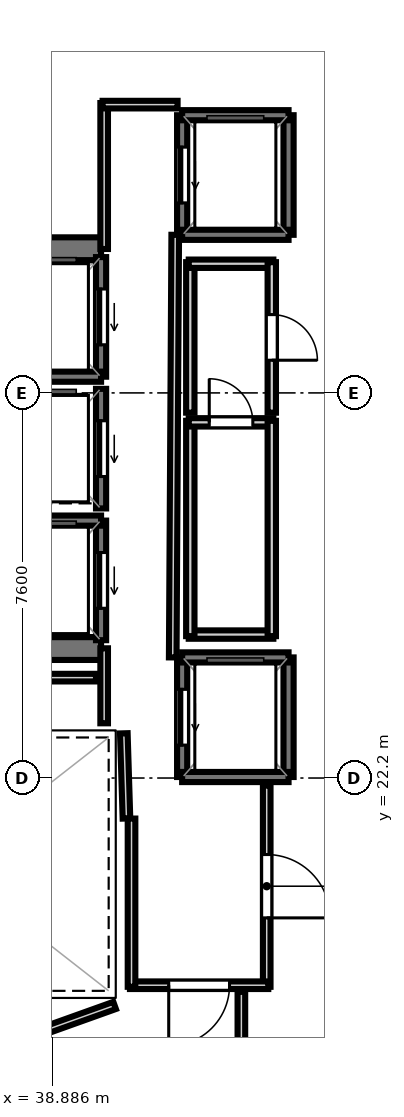
"""IFC4 building model, lengths in metres.
Left out: names, types, materials, properties, quantities, classifications, styles, units other than length and angle.
Written with IfcOpenShell. Run it as: python <this file> out.ifc"""

import sys

from ifc_helpers import new_model, si_unit, direction, frame, frame_2d, origin, place, context, subcontext, project, spatial, rectangle, extrude, element, fill, save


model = new_model("IFC4")
c1 = context("Model", 3, precision=1e-05, world=origin(), true_north=direction((0.0, 1.0)))
c2 = subcontext(c1, "Body", "Model", "MODEL_VIEW")
j1 = project(units=[si_unit("LENGTHUNIT", "METRE"), si_unit("PLANEANGLEUNIT", "RADIAN")], contexts=[c1])
p1 = place(None, origin())
s1 = spatial("IfcSite", under=j1, at=p1, CompositionType="ELEMENT")
p2 = place(p1, origin())
s2 = spatial("IfcBuilding", under=s1, at=p2, CompositionType="ELEMENT")
p3 = place(p2, frame((0.0, 0.0, 337.0)))
s3 = spatial("IfcBuildingStorey", under=s2, at=p3, CompositionType="ELEMENT", Elevation=337.0)
p4 = place(p3, frame((29.33, 32.645, 0.0), z_axis=(0.0, 0.0, 1.0), x_axis=(1.0, 0.0, 0.0)))
e1 = element("IfcWall", 1, at=p4, inside=s3, PredefinedType="SHEAR", context=c2, shape_type="SweptSolid", body=[
    extrude(rectangle(XDim=10.52, YDim=0.45, at=frame_2d((5.26, 0.0))), origin(), (0.0, 0.0, 1.0), 3.52),
])
p5 = place(p4, frame((0.895, 0.0, 0.0)))
e2 = element("IfcOpeningElement", 2, at=p5, cuts=e1, PredefinedType="OPENING", context=c2, shape_type="SweptSolid", body=[
    extrude(rectangle(XDim=1.25, YDim=2.15, at=frame_2d((0.625, 1.075))), frame((0.0, 0.235, 0.0), z_axis=(0.0, -1.0, 0.0), x_axis=(1.0, 0.0, 0.0)), (0.0, 0.0, 1.0), 0.47),
])
p6 = place(p3, frame((29.33, 24.755, 0.0), z_axis=(0.0, 0.0, 1.0), x_axis=(1.0, 0.0, 0.0)))
e3 = element("IfcWall", 3, at=p6, inside=s3, PredefinedType="SHEAR", context=c2, shape_type="SweptSolid", body=[
    extrude(rectangle(XDim=10.52, YDim=0.45, at=frame_2d((5.26, 0.0))), origin(), (0.0, 0.0, 1.0), 3.52),
])
p7 = place(p6, frame((0.695, 0.0, 0.0)))
e4 = element("IfcOpeningElement", 4, at=p7, cuts=e3, PredefinedType="OPENING", context=c2, shape_type="SweptSolid", body=[
    extrude(rectangle(XDim=1.25, YDim=2.15, at=frame_2d((0.625, 1.075))), frame((0.0, 0.235, 0.0), z_axis=(0.0, -1.0, 0.0), x_axis=(1.0, 0.0, 0.0)), (0.0, 0.0, 1.0), 0.47),
])
p8 = place(p3, frame((39.85, 30.12, 0.0), z_axis=(0.0, 0.0, 1.0), x_axis=(0.0, 1.0, 0.0)))
e5 = element("IfcWall", 5, at=p8, inside=s3, PredefinedType="SOLIDWALL", context=c2, shape_type="SweptSolid", body=[
    extrude(rectangle(XDim=2.36, YDim=0.2, at=frame_2d((1.18, 0.0))), origin(), (0.0, 0.0, 1.0), 3.52),
])
p9 = place(p8, frame((0.63, 0.0, 0.0)))
e6 = element("IfcOpeningElement", 6, at=p9, cuts=e5, PredefinedType="OPENING", context=c2, shape_type="SweptSolid", body=[
    extrude(rectangle(XDim=1.1, YDim=2.15, at=frame_2d((0.55, 1.075))), frame((0.0, 0.11, 0.0), z_axis=(0.0, -1.0, 0.0), x_axis=(1.0, 0.0, 0.0)), (0.0, 0.0, 1.0), 0.22),
])
p10 = place(p3, frame((37.75, 30.12, 0.0), z_axis=(0.0, 0.0, 1.0), x_axis=(1.0, 0.0, 0.0)))
e7 = element("IfcWall", 7, at=p10, inside=s3, PredefinedType="SOLIDWALL", context=c2, shape_type="SweptSolid", body=[
    extrude(rectangle(XDim=2.1, YDim=0.2, at=frame_2d((1.05, 0.0))), origin(), (0.0, 0.0, 1.0), 3.52),
])
p11 = place(p3, frame((39.85, 24.92, 0.0), z_axis=(0.0, 0.0, 1.0), x_axis=(0.0, 1.0, 0.0)))
e8 = element("IfcWall", 8, at=p11, inside=s3, PredefinedType="SOLIDWALL", context=c2, shape_type="SweptSolid", body=[
    extrude(rectangle(XDim=2.36, YDim=0.2, at=frame_2d((1.18, 0.0))), origin(), (0.0, 0.0, 1.0), 3.52),
])
p12 = place(p11, frame((0.63, 0.0, 0.0)))
e9 = element("IfcOpeningElement", 9, at=p12, cuts=e8, PredefinedType="OPENING", context=c2, shape_type="SweptSolid", body=[
    extrude(rectangle(XDim=1.1, YDim=2.15, at=frame_2d((0.55, 1.075))), frame((0.0, 0.11, 0.0), z_axis=(0.0, -1.0, 0.0), x_axis=(1.0, 0.0, 0.0)), (0.0, 0.0, 1.0), 0.22),
])
p13 = place(p3, frame((37.75, 27.28, 0.0), z_axis=(0.0, 0.0, 1.0), x_axis=(1.0, 0.0, 0.0)))
e10 = element("IfcWall", 10, at=p13, inside=s3, PredefinedType="SOLIDWALL", context=c2, shape_type="SweptSolid", body=[
    extrude(rectangle(XDim=2.1, YDim=0.2, at=frame_2d((1.05, 0.0))), origin(), (0.0, 0.0, 1.0), 3.52),
])
p14 = place(p3, frame((39.85, 27.52, 0.0), z_axis=(0.0, 0.0, 1.0), x_axis=(0.0, 1.0, 0.0)))
e11 = element("IfcWall", 11, at=p14, inside=s3, PredefinedType="SOLIDWALL", context=c2, shape_type="SweptSolid", body=[
    extrude(rectangle(XDim=2.36, YDim=0.2, at=frame_2d((1.18, 0.0))), origin(), (0.0, 0.0, 1.0), 3.52),
])
p15 = place(p14, frame((0.63, 0.0, 0.0)))
e12 = element("IfcOpeningElement", 12, at=p15, cuts=e11, PredefinedType="OPENING", context=c2, shape_type="SweptSolid", body=[
    extrude(rectangle(XDim=1.1, YDim=2.15, at=frame_2d((0.55, 1.075))), frame((0.0, 0.11, 0.0), z_axis=(0.0, -1.0, 0.0), x_axis=(1.0, 0.0, 0.0)), (0.0, 0.0, 1.0), 0.22),
])
p16 = place(p3, frame((43.55, 22.22, 0.0), z_axis=(0.0, 0.0, 1.0), x_axis=(0.0, 1.0, 0.0)))
e13 = element("IfcWall", 13, at=p16, inside=s3, PredefinedType="SOLIDWALL", context=c2, shape_type="SweptSolid", body=[
    extrude(rectangle(XDim=2.36, YDim=0.2, at=frame_2d((1.18, 0.0))), origin(), (0.0, 0.0, 1.0), 3.52),
])
p17 = place(p3, frame((41.45, 22.22, 0.0), z_axis=(0.0, 0.0, 1.0), x_axis=(0.0, 1.0, 0.0)))
e14 = element("IfcWall", 14, at=p17, inside=s3, PredefinedType="SOLIDWALL", context=c2, shape_type="SweptSolid", body=[
    extrude(rectangle(XDim=2.36, YDim=0.2, at=frame_2d((1.18, 0.0))), origin(), (0.0, 0.0, 1.0), 3.52),
])
p18 = place(p17, frame((0.63, 0.0, 0.0)))
e15 = element("IfcOpeningElement", 15, at=p18, cuts=e14, PredefinedType="OPENING", context=c2, shape_type="SweptSolid", body=[
    extrude(rectangle(XDim=1.1, YDim=2.15, at=frame_2d((0.55, 1.075))), frame((0.0, 0.11, 0.0), z_axis=(0.0, -1.0, 0.0), x_axis=(1.0, 0.0, 0.0)), (0.0, 0.0, 1.0), 0.22),
])
for number, where, z_axis, x_axis in (
    (16, (41.45, 24.58, 0.0), (0.0, 0.0, 1.0), (1.0, 0.0, 0.0)),
    (17, (41.45, 22.22, 0.0), (0.0, 0.0, 1.0), (1.0, 0.0, 0.0)),
):
    element("IfcWall", number, at=place(p3, frame(where, z_axis=z_axis, x_axis=x_axis)), inside=s3, PredefinedType="SOLIDWALL", context=c2, shape_type="SweptSolid", body=[
        extrude(rectangle(XDim=2.1, YDim=0.2, at=frame_2d((1.05, 0.0))), origin(), (0.0, 0.0, 1.0), 3.52),
    ])
p19 = place(p3, frame((43.55, 32.92, 0.0), z_axis=(0.0, 0.0, 1.0), x_axis=(0.0, 1.0, 0.0)))
e18 = element("IfcWall", 18, at=p19, inside=s3, PredefinedType="SOLIDWALL", context=c2, shape_type="SweptSolid", body=[
    extrude(rectangle(XDim=2.36, YDim=0.2, at=frame_2d((1.18, 0.0))), origin(), (0.0, 0.0, 1.0), 3.52),
])
p20 = place(p3, frame((41.45, 32.92, 0.0), z_axis=(0.0, 0.0, 1.0), x_axis=(0.0, 1.0, 0.0)))
e19 = element("IfcWall", 19, at=p20, inside=s3, PredefinedType="SOLIDWALL", context=c2, shape_type="SweptSolid", body=[
    extrude(rectangle(XDim=2.36, YDim=0.2, at=frame_2d((1.18, 0.0))), origin(), (0.0, 0.0, 1.0), 3.52),
])
p21 = place(p20, frame((0.63, 0.0, 0.0)))
e20 = element("IfcOpeningElement", 20, at=p21, cuts=e19, PredefinedType="OPENING", context=c2, shape_type="SweptSolid", body=[
    extrude(rectangle(XDim=1.1, YDim=2.15, at=frame_2d((0.55, 1.075))), frame((0.0, 0.11, 0.0), z_axis=(0.0, -1.0, 0.0), x_axis=(1.0, 0.0, 0.0)), (0.0, 0.0, 1.0), 0.22),
])
for number, where, z_axis, x_axis in (
    (21, (41.45, 35.28, 0.0), (0.0, 0.0, 1.0), (1.0, 0.0, 0.0)),
    (22, (41.45, 32.92, 0.0), (0.0, 0.0, 1.0), (1.0, 0.0, 0.0)),
):
    element("IfcWall", number, at=place(p3, frame(where, z_axis=z_axis, x_axis=x_axis)), inside=s3, PredefinedType="SOLIDWALL", context=c2, shape_type="SweptSolid", body=[
        extrude(rectangle(XDim=2.1, YDim=0.2, at=frame_2d((1.05, 0.0))), origin(), (0.0, 0.0, 1.0), 3.52),
    ])
p22 = place(p3, frame((40.351, 21.401, 0.0), z_axis=(0.0, 0.0, 1.0), x_axis=(-0.031058045979, 0.999517582527, 0.0)))
e23 = element("IfcWall", 23, at=p22, inside=s3, PredefinedType="PARTITIONING", context=c2, shape_type="SweptSolid", body=[
    extrude(rectangle(XDim=1.682, YDim=0.15, at=frame_2d((0.841, 0.0))), origin(), (0.0, 0.0, 1.0), 2.84),
])
p23 = place(p3, frame((39.911, 23.28, 0.0), z_axis=(0.0, 0.0, 1.0), x_axis=(0.0, 1.0, 0.0)))
e24 = element("IfcWall", 24, at=p23, inside=s3, PredefinedType="PARTITIONING", context=c2, shape_type="SweptSolid", body=[
    extrude(rectangle(XDim=1.48, YDim=0.15, at=frame_2d((0.74, 0.0))), origin(), (0.0, 0.0, 1.0), 2.84),
])
p24 = place(p3, frame((39.911, 32.64, 0.0), z_axis=(0.0, 0.0, 1.0), x_axis=(0.0, 1.0, 0.0)))
e25 = element("IfcWall", 25, at=p24, inside=s3, PredefinedType="PARTITIONING", context=c2, shape_type="SweptSolid", body=[
    extrude(rectangle(XDim=2.88, YDim=0.15, at=frame_2d((1.44, 0.0))), origin(), (0.0, 0.0, 1.0), 2.84),
])
p25 = place(p3, frame((39.88, 35.489, 0.0), z_axis=(0.0, 0.0, 1.0), x_axis=(1.0, 0.0, 0.0)))
e26 = element("IfcWall", 26, at=p25, inside=s3, PredefinedType="PARTITIONING", context=c2, shape_type="SweptSolid", body=[
    extrude(rectangle(XDim=1.48, YDim=0.15, at=frame_2d((0.74, 0.0))), origin(), (0.0, 0.0, 1.0), 2.84),
])
p26 = place(p3, frame((41.313, 32.92, 0.0), z_axis=(0.0, 0.0, 1.0), x_axis=(-0.005942518022, -0.999982343084, 0.0)))
e27 = element("IfcWall", 27, at=p26, inside=s3, PredefinedType="PARTITIONING", context=c2, shape_type="SweptSolid", body=[
    extrude(rectangle(XDim=8.34, YDim=0.15, at=frame_2d((4.17, 0.0))), origin(), (0.0, 0.0, 1.0), 2.84),
])
p27 = place(p3, frame((43.119, 22.05, 0.0), z_axis=(0.0, 0.0, 1.0), x_axis=(0.0, -1.0, 0.0)))
e28 = element("IfcWall", 28, at=p27, inside=s3, PredefinedType="PARTITIONING", context=c2, shape_type="SweptSolid", body=[
    extrude(rectangle(XDim=3.97, YDim=0.15, at=frame_2d((1.985, 0.0))), origin(), (0.0, 0.0, 1.0), 2.84),
])
p28 = place(p27, frame((1.36, 0.0, 0.0)))
e29 = element("IfcOpeningElement", 29, at=p28, cuts=e28, PredefinedType="OPENING", context=c2, shape_type="SweptSolid", body=[
    extrude(rectangle(XDim=1.25, YDim=2.2, at=frame_2d((0.625, 1.1))), frame((0.0, 0.085, 0.0), z_axis=(0.0, -1.0, 0.0), x_axis=(1.0, 0.0, 0.0)), (0.0, 0.0, 1.0), 0.17),
])
p29 = place(p3, frame((43.15, 18.111, 0.0), z_axis=(0.0, 0.0, 1.0), x_axis=(-1.0, 0.0, 0.0)))
e30 = element("IfcWall", 30, at=p29, inside=s3, PredefinedType="PARTITIONING", context=c2, shape_type="SweptSolid", body=[
    extrude(rectangle(XDim=2.73, YDim=0.15, at=frame_2d((1.365, 0.0))), origin(), (0.0, 0.0, 1.0), 2.84),
])
p30 = place(p29, frame((0.765, 0.0, 0.0)))
e31 = element("IfcOpeningElement", 31, at=p30, cuts=e30, PredefinedType="OPENING", context=c2, shape_type="SweptSolid", body=[
    extrude(rectangle(XDim=1.2, YDim=2.15, at=frame_2d((0.6, 1.075))), frame((0.0, 0.085, 0.0), z_axis=(0.0, -1.0, 0.0), x_axis=(1.0, 0.0, 0.0)), (0.0, 0.0, 1.0), 0.17),
])
p31 = place(p3, frame((40.451, 18.08, 0.0), z_axis=(0.0, 0.0, 1.0), x_axis=(0.0, 1.0, 0.0)))
e32 = element("IfcWall", 32, at=p31, inside=s3, PredefinedType="PARTITIONING", context=c2, shape_type="SweptSolid", body=[
    extrude(rectangle(XDim=3.32, YDim=0.15, at=frame_2d((1.66, 0.0))), origin(), (0.0, 0.0, 1.0), 2.84),
])
p32 = place(p3, frame((43.25, 25.031, 0.0), z_axis=(0.0, 0.0, 1.0), x_axis=(-1.0, 0.0, 0.0)))
e33 = element("IfcWall", 33, at=p32, inside=s3, PredefinedType="PLUMBINGWALL", context=c2, shape_type="SweptSolid", body=[
    extrude(rectangle(XDim=1.67, YDim=0.165, at=frame_2d((0.835, 0.0))), origin(), (0.0, 0.0, 1.0), 2.84),
])
p33 = place(p3, frame((41.611, 25.0, 0.0), z_axis=(0.0, 0.0, 1.0), x_axis=(0.0, 1.0, 0.0)))
e34 = element("IfcWall", 34, at=p33, inside=s3, PredefinedType="PLUMBINGWALL", context=c2, shape_type="SweptSolid", body=[
    extrude(rectangle(XDim=4.25, YDim=0.165, at=frame_2d((2.125, 0.0))), origin(), (0.0, 0.0, 1.0), 2.84),
])
p34 = place(p3, frame((41.58, 29.219, 0.0), z_axis=(0.0, 0.0, 1.0), x_axis=(1.0, 0.0, 0.0)))
e35 = element("IfcWall", 35, at=p34, inside=s3, PredefinedType="PLUMBINGWALL", context=c2, shape_type="SweptSolid", body=[
    extrude(rectangle(XDim=1.67, YDim=0.165, at=frame_2d((0.835, 0.0))), origin(), (0.0, 0.0, 1.0), 2.84),
])
p35 = place(p34, frame((0.405, 0.0, 0.0)))
e36 = element("IfcOpeningElement", 36, at=p35, cuts=e35, PredefinedType="OPENING", context=c2, shape_type="SweptSolid", body=[
    extrude(rectangle(XDim=0.86, YDim=2.05, at=frame_2d((0.43, 1.025))), frame((0.0, 0.093, 0.0), z_axis=(0.0, -1.0, 0.0), x_axis=(1.0, 0.0, 0.0)), (0.0, 0.0, 1.0), 0.185),
])
p36 = place(p3, frame((43.219, 29.25, 0.0), z_axis=(0.0, 0.0, 1.0), x_axis=(0.0, -1.0, 0.0)))
e37 = element("IfcWall", 37, at=p36, inside=s3, PredefinedType="PLUMBINGWALL", context=c2, shape_type="SweptSolid", body=[
    extrude(rectangle(XDim=4.25, YDim=0.165, at=frame_2d((2.125, 0.0))), origin(), (0.0, 0.0, 1.0), 2.84),
])
p37 = place(p3, frame((41.611, 29.41, 0.0), z_axis=(0.0, 0.0, 1.0), x_axis=(0.0, 1.0, 0.0)))
e38 = element("IfcWall", 38, at=p37, inside=s3, PredefinedType="PLUMBINGWALL", context=c2, shape_type="SweptSolid", body=[
    extrude(rectangle(XDim=2.97, YDim=0.165, at=frame_2d((1.485, 0.0))), origin(), (0.0, 0.0, 1.0), 2.84),
])
p38 = place(p3, frame((41.58, 32.349, 0.0), z_axis=(0.0, 0.0, 1.0), x_axis=(1.0, 0.0, 0.0)))
e39 = element("IfcWall", 39, at=p38, inside=s3, PredefinedType="PLUMBINGWALL", context=c2, shape_type="SweptSolid", body=[
    extrude(rectangle(XDim=1.67, YDim=0.165, at=frame_2d((0.835, 0.0))), origin(), (0.0, 0.0, 1.0), 2.84),
])
p39 = place(p3, frame((43.219, 32.38, 0.0), z_axis=(0.0, 0.0, 1.0), x_axis=(0.0, -1.0, 0.0)))
e40 = element("IfcWall", 40, at=p39, inside=s3, PredefinedType="PLUMBINGWALL", context=c2, shape_type="SweptSolid", body=[
    extrude(rectangle(XDim=2.97, YDim=0.165, at=frame_2d((1.485, 0.0))), origin(), (0.0, 0.0, 1.0), 2.84),
])
p40 = place(p39, frame((1.035, 0.0, 0.0)))
e41 = element("IfcOpeningElement", 41, at=p40, cuts=e40, PredefinedType="OPENING", context=c2, shape_type="SweptSolid", body=[
    extrude(rectangle(XDim=0.9, YDim=2.1, at=frame_2d((0.45, 1.05))), frame((0.0, 0.093, 0.0), z_axis=(0.0, -1.0, 0.0), x_axis=(1.0, 0.0, 0.0)), (0.0, 0.0, 1.0), 0.185),
])
p41 = place(p3, frame((39.75, 24.181, 0.0), z_axis=(0.0, 0.0, 1.0), x_axis=(-1.0, 0.0, 0.0)))
e42 = element("IfcWall", 42, at=p41, inside=s3, PredefinedType="PARTITIONING", context=c2, shape_type="SweptSolid", body=[
    extrude(rectangle(XDim=6.22, YDim=0.15, at=frame_2d((3.11, 0.0))), origin(), (0.0, 0.0, 1.0), 2.84),
])
p42 = place(p3, frame((36.81, 16.529, 0.0), z_axis=(0.0, 0.0, 1.0), x_axis=(0.941548344365, 0.33687789364, 0.0)))
e43 = element("IfcWall", 43, at=p42, inside=s3, PredefinedType="PARTITIONING", context=c2, shape_type="SweptSolid", body=[
    extrude(rectangle(XDim=3.513, YDim=0.15, at=frame_2d((1.756, 0.0))), origin(), (0.0, 0.0, 1.0), 2.84),
])
p43 = place(p3, frame((42.619, 17.98, 0.0), z_axis=(0.0, 0.0, 1.0), x_axis=(0.0, -1.0, 0.0)))
e44 = element("IfcWall", 44, at=p43, inside=s3, PredefinedType="PARTITIONING", context=c2, shape_type="SweptSolid", body=[
    extrude(rectangle(XDim=1.93, YDim=0.15, at=frame_2d((0.965, 0.0))), origin(), (0.0, 0.0, 1.0), 2.84),
])
p44 = place(p3, frame((53.648, 39.995, 0.0), z_axis=(0.0, 0.0, 1.0), x_axis=(-0.368887988712, -0.929473857505, 0.0)))
e45 = element("IfcWall", 45, at=p44, inside=s3, PredefinedType="PARTITIONING", context=c2, shape_type="SweptSolid", body=[
    extrude(rectangle(XDim=35.003, YDim=0.105, at=frame_2d((17.501, 0.0))), origin(), (0.0, 0.0, 1.0), 2.84),
])
p45 = place(p9, origin())
e46 = element("IfcDoor", 46, at=p45, inside=s3, OperationType="SLIDING_TO_LEFT", PredefinedType="DOOR", context=c2, shape_type="SweptSolid", body=[
    extrude(rectangle(XDim=1.1, YDim=2.15, at=frame_2d((0.55, 1.075))), frame((0.0, 0.025, 0.0), z_axis=(0.0, -1.0, 0.0), x_axis=(1.0, 0.0, 0.0)), (0.0, 0.0, 1.0), 0.05),
])
fill(e6, e46)
p46 = place(p12, origin())
e47 = element("IfcDoor", 47, at=p46, inside=s3, OperationType="SLIDING_TO_LEFT", PredefinedType="DOOR", context=c2, shape_type="SweptSolid", body=[
    extrude(rectangle(XDim=1.1, YDim=2.15, at=frame_2d((0.55, 1.075))), frame((0.0, 0.025, 0.0), z_axis=(0.0, -1.0, 0.0), x_axis=(1.0, 0.0, 0.0)), (0.0, 0.0, 1.0), 0.05),
])
fill(e9, e47)
p47 = place(p15, origin())
e48 = element("IfcDoor", 48, at=p47, inside=s3, OperationType="SLIDING_TO_LEFT", PredefinedType="DOOR", context=c2, shape_type="SweptSolid", body=[
    extrude(rectangle(XDim=1.1, YDim=2.15, at=frame_2d((0.55, 1.075))), frame((0.0, 0.025, 0.0), z_axis=(0.0, -1.0, 0.0), x_axis=(1.0, 0.0, 0.0)), (0.0, 0.0, 1.0), 0.05),
])
fill(e12, e48)
p48 = place(p18, origin())
e49 = element("IfcDoor", 49, at=p48, inside=s3, OperationType="SLIDING_TO_LEFT", PredefinedType="DOOR", context=c2, shape_type="SweptSolid", body=[
    extrude(rectangle(XDim=1.1, YDim=2.15, at=frame_2d((0.55, 1.075))), frame((0.0, 0.025, 0.0), z_axis=(0.0, -1.0, 0.0), x_axis=(1.0, 0.0, 0.0)), (0.0, 0.0, 1.0), 0.05),
])
fill(e15, e49)
p49 = place(p21, origin())
e50 = element("IfcDoor", 50, at=p49, inside=s3, OperationType="SLIDING_TO_LEFT", PredefinedType="DOOR", context=c2, shape_type="SweptSolid", body=[
    extrude(rectangle(XDim=1.1, YDim=2.15, at=frame_2d((0.55, 1.075))), frame((0.0, 0.025, 0.0), z_axis=(0.0, -1.0, 0.0), x_axis=(1.0, 0.0, 0.0)), (0.0, 0.0, 1.0), 0.05),
])
fill(e20, e50)
p50 = place(p30, origin())
e51 = element("IfcDoor", 51, at=p50, inside=s3, OperationType="SINGLE_SWING_RIGHT", PredefinedType="DOOR", context=c2, shape_type="SweptSolid", body=[
    extrude(rectangle(XDim=1.2, YDim=2.15, at=frame_2d((0.6, 1.075))), frame((0.0, 0.025, 0.0), z_axis=(0.0, -1.0, 0.0), x_axis=(1.0, 0.0, 0.0)), (0.0, 0.0, 1.0), 0.05),
])
fill(e31, e51)
p51 = place(p28, origin())
e52 = element("IfcDoor", 52, at=p51, inside=s3, OperationType="SINGLE_SWING_RIGHT", PredefinedType="DOOR", context=c2, shape_type="SweptSolid", body=[
    extrude(rectangle(XDim=1.25, YDim=2.2, at=frame_2d((0.625, 1.1))), frame((0.0, 0.025, 0.0), z_axis=(0.0, -1.0, 0.0), x_axis=(1.0, 0.0, 0.0)), (0.0, 0.0, 1.0), 0.05),
])
fill(e29, e52)
p52 = place(p40, origin())
e53 = element("IfcDoor", 53, at=p52, inside=s3, OperationType="SINGLE_SWING_RIGHT", PredefinedType="DOOR", context=c2, shape_type="SweptSolid", body=[
    extrude(rectangle(XDim=0.9, YDim=2.1, at=frame_2d((0.45, 1.05))), frame((0.0, 0.025, 0.0), z_axis=(0.0, -1.0, 0.0), x_axis=(1.0, 0.0, 0.0)), (0.0, 0.0, 1.0), 0.05),
])
fill(e41, e53)
p53 = place(p35, origin())
e54 = element("IfcDoor", 54, at=p53, inside=s3, OperationType="SINGLE_SWING_LEFT", PredefinedType="DOOR", context=c2, shape_type="SweptSolid", body=[
    extrude(rectangle(XDim=0.86, YDim=2.05, at=frame_2d((0.43, 1.025))), frame((0.0, 0.025, 0.0), z_axis=(0.0, -1.0, 0.0), x_axis=(1.0, 0.0, 0.0)), (0.0, 0.0, 1.0), 0.05),
])
fill(e36, e54)
save(model, sys.argv[1])
